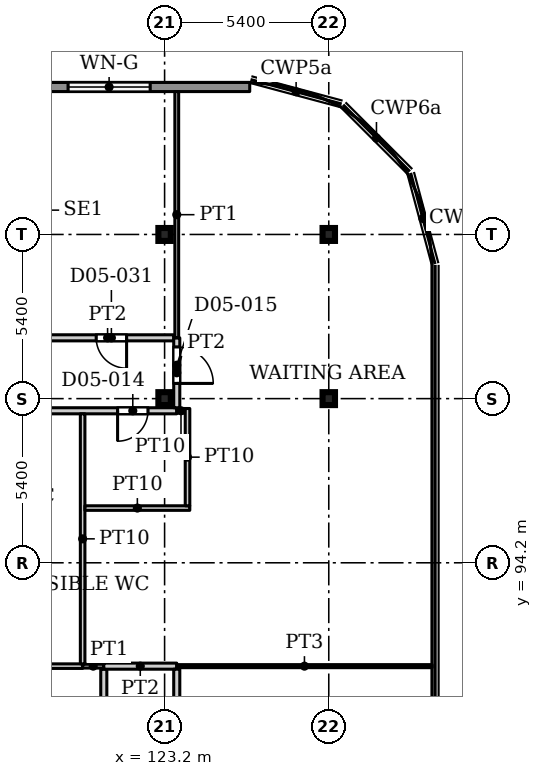
"""IFC4 building model, lengths in metres.
Left out: names, types, materials, properties, quantities, classifications, styles, units other than length and angle.
Written with IfcOpenShell. Run it as: python <this file> out.ifc"""

import sys

from ifc_helpers import new_model, si_unit, direction, frame, frame_2d, origin, origin_2d, place, context, subcontext, project, spatial, rectangle, i_section, extrude, source, transform, mapped, element, fill, save


model = new_model("IFC4")
c1 = context("Model", 3, precision=1e-05, world=origin(), true_north=direction((0.0, 1.0)))
c2 = subcontext(c1, "Body", "Model", "MODEL_VIEW")
j1 = project(units=[si_unit("LENGTHUNIT", "METRE"), si_unit("PLANEANGLEUNIT", "RADIAN")], contexts=[c1])
p1 = place(None, origin())
s1 = spatial("IfcSite", under=j1, at=p1, CompositionType="ELEMENT")
p2 = place(p1, origin())
s2 = spatial("IfcBuilding", under=s1, at=p2, CompositionType="ELEMENT")
p3 = place(p2, frame((0.0, 0.0, 26.0)))
s3 = spatial("IfcBuildingStorey", under=s2, at=p3, CompositionType="ELEMENT", Elevation=26.0)
for number, where, z_axis, x_axis in (
    (1, (123.2, 99.6, 0.0), (0.0, 0.0, 1.0), (1.0, 0.0, 0.0)),
    (2, (128.6, 99.6, 0.0), (0.0, 0.0, 1.0), (1.0, 0.0, 0.0)),
    (3, (123.2, 105.0, 0.0), (0.0, 0.0, 1.0), (1.0, 0.0, 0.0)),
    (4, (128.6, 105.0, 0.0), (0.0, 0.0, 1.0), (1.0, 0.0, 0.0)),
):
    element("IfcColumn", number, at=place(p3, frame(where, z_axis=z_axis, x_axis=x_axis)), inside=s3, PredefinedType="COLUMN", context=c2, shape_type="SweptSolid", body=[
        extrude(i_section(OverallWidth=0.409, OverallDepth=0.425, WebThickness=0.033, FlangeThickness=0.052, FilletRadius=0.013, at=origin_2d()), origin(), (0.0, 0.0, 1.0), 4.5),
    ])
p4 = place(p3, frame((78.48, 109.85, 0.0), z_axis=(0.0, 0.0, 1.0), x_axis=(1.0, 0.0, 0.0)))
e5 = element("IfcWall", 5, at=p4, inside=s3, PredefinedType="SOLIDWALL", context=c2, shape_type="SweptSolid", body=[
    extrude(rectangle(XDim=47.52, YDim=0.3, at=frame_2d((23.76, 0.0))), origin(), (0.0, 0.0, 1.0), 4.25),
])
p5 = place(p4, frame((1.045, 0.0, 2.4)))
e6 = element("IfcOpeningElement", 6, at=p5, cuts=e5, PredefinedType="OPENING", context=c2, shape_type="SweptSolid", body=[
    extrude(rectangle(XDim=2.7, YDim=1.2, at=frame_2d((1.35, 0.6))), frame((0.0, 0.16, 0.0), z_axis=(0.0, -1.0, 0.0), x_axis=(1.0, 0.0, 0.0)), (0.0, 0.0, 1.0), 0.32),
])
p6 = place(p4, frame((6.28, 0.0, 2.4)))
e7 = element("IfcOpeningElement", 7, at=p6, cuts=e5, PredefinedType="OPENING", context=c2, shape_type="SweptSolid", body=[
    extrude(rectangle(XDim=2.7, YDim=1.2, at=frame_2d((1.35, 0.6))), frame((0.0, 0.16, 0.0), z_axis=(0.0, -1.0, 0.0), x_axis=(1.0, 0.0, 0.0)), (0.0, 0.0, 1.0), 0.32),
])
p7 = place(p4, frame((15.765, 0.0, 2.4)))
e8 = element("IfcOpeningElement", 8, at=p7, cuts=e5, PredefinedType="OPENING", context=c2, shape_type="SweptSolid", body=[
    extrude(rectangle(XDim=2.7, YDim=1.2, at=frame_2d((1.35, 0.6))), frame((0.0, 0.16, 0.0), z_axis=(0.0, -1.0, 0.0), x_axis=(1.0, 0.0, 0.0)), (0.0, 0.0, 1.0), 0.32),
])
p8 = place(p4, frame((22.47, 0.0, 2.4)))
e9 = element("IfcOpeningElement", 9, at=p8, cuts=e5, PredefinedType="OPENING", context=c2, shape_type="SweptSolid", body=[
    extrude(rectangle(XDim=2.7, YDim=1.2, at=frame_2d((1.35, 0.6))), frame((0.0, 0.16, 0.0), z_axis=(0.0, -1.0, 0.0), x_axis=(1.0, 0.0, 0.0)), (0.0, 0.0, 1.0), 0.32),
])
p9 = place(p4, frame((30.99, 0.0, 2.4)))
e10 = element("IfcOpeningElement", 10, at=p9, cuts=e5, PredefinedType="OPENING", context=c2, shape_type="SweptSolid", body=[
    extrude(rectangle(XDim=2.7, YDim=1.2, at=frame_2d((1.35, 0.6))), frame((0.0, 0.16, 0.0), z_axis=(0.0, -1.0, 0.0), x_axis=(1.0, 0.0, 0.0)), (0.0, 0.0, 1.0), 0.32),
])
p10 = place(p4, frame((41.545, 0.0, 2.4)))
e11 = element("IfcOpeningElement", 11, at=p10, cuts=e5, PredefinedType="OPENING", context=c2, shape_type="SweptSolid", body=[
    extrude(rectangle(XDim=2.7, YDim=1.2, at=frame_2d((1.35, 0.6))), frame((0.0, 0.16, 0.0), z_axis=(0.0, -1.0, 0.0), x_axis=(1.0, 0.0, 0.0)), (0.0, 0.0, 1.0), 0.32),
])
p11 = place(p3, frame((56.1, 99.2, 0.0), z_axis=(0.0, 0.0, 1.0), x_axis=(1.0, 0.0, 0.0)))
e12 = element("IfcWall", 12, at=p11, inside=s3, PredefinedType="PARTITIONING", context=c2, shape_type="SweptSolid", body=[
    extrude(rectangle(XDim=67.5, YDim=0.2, at=frame_2d((33.75, 0.0))), origin(), (0.0, 0.0, 1.0), 4.2),
])
p12 = place(p11, frame((4.05, 0.0, 0.0)))
e13 = element("IfcOpeningElement", 13, at=p12, cuts=e12, PredefinedType="OPENING", context=c2, shape_type="SweptSolid", body=[
    extrude(rectangle(XDim=1.0, YDim=2.1, at=frame_2d((0.5, 1.05))), frame((0.0, 0.11, 0.0), z_axis=(0.0, -1.0, 0.0), x_axis=(1.0, 0.0, 0.0)), (0.0, 0.0, 1.0), 0.22),
])
p13 = place(p11, frame((65.554, 0.0, 0.0)))
e14 = element("IfcOpeningElement", 14, at=p13, cuts=e12, PredefinedType="OPENING", context=c2, shape_type="SweptSolid", body=[
    extrude(rectangle(XDim=1.0, YDim=2.1, at=frame_2d((0.5, 1.05))), frame((0.0, 0.11, 0.0), z_axis=(0.0, -1.0, 0.0), x_axis=(1.0, 0.0, 0.0)), (0.0, 0.0, 1.0), 0.22),
])
p14 = place(p11, frame((11.589, 0.0, 0.0)))
e15 = element("IfcOpeningElement", 15, at=p14, cuts=e12, PredefinedType="OPENING", context=c2, shape_type="SweptSolid", body=[
    extrude(rectangle(XDim=1.0, YDim=2.1, at=frame_2d((0.5, 1.05))), frame((0.0, 0.11, 0.0), z_axis=(0.0, -1.0, 0.0), x_axis=(1.0, 0.0, 0.0)), (0.0, 0.0, 1.0), 0.22),
])
p15 = place(p11, frame((20.329, 0.0, 0.0)))
e16 = element("IfcOpeningElement", 16, at=p15, cuts=e12, PredefinedType="OPENING", context=c2, shape_type="SweptSolid", body=[
    extrude(rectangle(XDim=1.0, YDim=2.1, at=frame_2d((0.5, 1.05))), frame((0.0, 0.11, 0.0), z_axis=(0.0, -1.0, 0.0), x_axis=(1.0, 0.0, 0.0)), (0.0, 0.0, 1.0), 0.22),
])
p16 = place(p11, frame((27.319, 0.0, 0.0)))
e17 = element("IfcOpeningElement", 17, at=p16, cuts=e12, PredefinedType="OPENING", context=c2, shape_type="SweptSolid", body=[
    extrude(rectangle(XDim=1.0, YDim=2.1, at=frame_2d((0.5, 1.05))), frame((0.0, 0.11, 0.0), z_axis=(0.0, -1.0, 0.0), x_axis=(1.0, 0.0, 0.0)), (0.0, 0.0, 1.0), 0.22),
])
p17 = place(p11, frame((33.262, 0.0, 0.0)))
e18 = element("IfcOpeningElement", 18, at=p17, cuts=e12, PredefinedType="OPENING", context=c2, shape_type="SweptSolid", body=[
    extrude(rectangle(XDim=1.0, YDim=2.1, at=frame_2d((0.5, 1.05))), frame((0.0, 0.11, 0.0), z_axis=(0.0, -1.0, 0.0), x_axis=(1.0, 0.0, 0.0)), (0.0, 0.0, 1.0), 0.22),
])
p18 = place(p11, frame((42.002, 0.0, 0.0)))
e19 = element("IfcOpeningElement", 19, at=p18, cuts=e12, PredefinedType="OPENING", context=c2, shape_type="SweptSolid", body=[
    extrude(rectangle(XDim=1.0, YDim=2.1, at=frame_2d((0.5, 1.05))), frame((0.0, 0.11, 0.0), z_axis=(0.0, -1.0, 0.0), x_axis=(1.0, 0.0, 0.0)), (0.0, 0.0, 1.0), 0.22),
])
p19 = place(p11, frame((49.743, 0.0, 0.0)))
e20 = element("IfcOpeningElement", 20, at=p19, cuts=e12, PredefinedType="OPENING", context=c2, shape_type="SweptSolid", body=[
    extrude(rectangle(XDim=1.0, YDim=2.1, at=frame_2d((0.5, 1.05))), frame((0.0, 0.11, 0.0), z_axis=(0.0, -1.0, 0.0), x_axis=(1.0, 0.0, 0.0)), (0.0, 0.0, 1.0), 0.22),
])
p20 = place(p11, frame((56.733, 0.0, 0.0)))
e21 = element("IfcOpeningElement", 21, at=p20, cuts=e12, PredefinedType="OPENING", context=c2, shape_type="SweptSolid", body=[
    extrude(rectangle(XDim=1.0, YDim=2.1, at=frame_2d((0.5, 1.05))), frame((0.0, 0.11, 0.0), z_axis=(0.0, -1.0, 0.0), x_axis=(1.0, 0.0, 0.0)), (0.0, 0.0, 1.0), 0.22),
])
p21 = place(p11, frame((61.394, 0.0, 0.0)))
e22 = element("IfcOpeningElement", 22, at=p21, cuts=e12, PredefinedType="OPENING", context=c2, shape_type="SweptSolid", body=[
    extrude(rectangle(XDim=1.0, YDim=2.1, at=frame_2d((0.5, 1.05))), frame((0.0, 0.11, 0.0), z_axis=(0.0, -1.0, 0.0), x_axis=(1.0, 0.0, 0.0)), (0.0, 0.0, 1.0), 0.22),
])
p22 = place(p3, frame((110.183, 90.8, 0.0), z_axis=(0.0, 0.0, 1.0), x_axis=(1.0, 0.0, 0.0)))
e23 = element("IfcWall", 23, at=p22, inside=s3, PredefinedType="PARTITIONING", context=c2, shape_type="SweptSolid", body=[
    extrude(rectangle(XDim=10.321, YDim=0.15, at=frame_2d((5.16, 0.0))), origin(), (0.0, 0.0, 1.0), 4.2),
])
p23 = place(p3, frame((119.15, 101.6, 0.0), z_axis=(0.0, 0.0, 1.0), x_axis=(1.0, 0.0, 0.0)))
e24 = element("IfcWall", 24, at=p23, inside=s3, PredefinedType="PARTITIONING", context=c2, shape_type="SweptSolid", body=[
    extrude(rectangle(XDim=4.35, YDim=0.2, at=frame_2d((2.175, 0.0))), origin(), (0.0, 0.0, 1.0), 4.2),
])
p24 = place(p23, frame((1.8, 0.0, 0.0)))
e25 = element("IfcOpeningElement", 25, at=p24, cuts=e24, PredefinedType="OPENING", context=c2, shape_type="SweptSolid", body=[
    extrude(rectangle(XDim=1.0, YDim=2.1, at=frame_2d((0.5, 1.05))), frame((0.0, 0.11, 0.0), z_axis=(0.0, -1.0, 0.0), x_axis=(1.0, 0.0, 0.0)), (0.0, 0.0, 1.0), 0.22),
])
p25 = place(p3, frame((120.504, 90.8, 0.0), z_axis=(0.0, 0.0, 1.0), x_axis=(1.0, 0.0, 0.0)))
e26 = element("IfcWall", 26, at=p25, inside=s3, PredefinedType="PARTITIONING", context=c2, shape_type="SweptSolid", body=[
    extrude(rectangle(XDim=0.696, YDim=0.125, at=frame_2d((0.348, 0.0))), origin(), (0.0, 0.0, 1.0), 4.2),
])
p26 = place(p3, frame((120.504, 90.875, 0.0), z_axis=(0.0, 0.0, 1.0), x_axis=(0.0, 1.0, 0.0)))
e27 = element("IfcWall", 27, at=p26, inside=s3, PredefinedType="PARTITIONING", context=c2, shape_type="SweptSolid", body=[
    extrude(rectangle(XDim=8.225, YDim=0.15, at=frame_2d((4.113, 0.0))), origin(), (0.0, 0.0, 1.0), 4.2),
])
p27 = place(p3, frame((120.579, 96.0, 0.0), z_axis=(0.0, 0.0, 1.0), x_axis=(1.0, 0.0, 0.0)))
e28 = element("IfcWall", 28, at=p27, inside=s3, PredefinedType="PARTITIONING", context=c2, shape_type="SweptSolid", body=[
    extrude(rectangle(XDim=3.45, YDim=0.15, at=frame_2d((1.725, 0.0))), origin(), (0.0, 0.0, 1.0), 4.2),
])
p28 = place(p3, frame((121.2, 74.6, 0.0), z_axis=(0.0, 0.0, 1.0), x_axis=(0.0, 1.0, 0.0)))
e29 = element("IfcWall", 29, at=p28, inside=s3, PredefinedType="PARTITIONING", context=c2, shape_type="SweptSolid", body=[
    extrude(rectangle(XDim=16.1, YDim=0.2, at=frame_2d((8.05, 0.0))), origin(), (0.0, 0.0, 1.0), 4.2),
])
p29 = place(p28, frame((3.987, 0.0, 0.0)))
e30 = element("IfcOpeningElement", 30, at=p29, cuts=e29, PredefinedType="OPENING", context=c2, shape_type="SweptSolid", body=[
    extrude(rectangle(XDim=1.0, YDim=2.1, at=frame_2d((0.5, 1.05))), frame((0.0, 0.11, 0.0), z_axis=(0.0, -1.0, 0.0), x_axis=(1.0, 0.0, 0.0)), (0.0, 0.0, 1.0), 0.22),
])
p30 = place(p28, frame((12.05, 0.0, 0.0)))
e31 = element("IfcOpeningElement", 31, at=p30, cuts=e29, PredefinedType="OPENING", context=c2, shape_type="SweptSolid", body=[
    extrude(rectangle(XDim=1.0, YDim=2.1, at=frame_2d((0.5, 1.05))), frame((0.0, 0.11, 0.0), z_axis=(0.0, -1.0, 0.0), x_axis=(1.0, 0.0, 0.0)), (0.0, 0.0, 1.0), 0.22),
])
p31 = place(p3, frame((121.2, 90.8, 0.0), z_axis=(0.0, 0.0, 1.0), x_axis=(1.0, 0.0, 0.0)))
e32 = element("IfcWall", 32, at=p31, inside=s3, PredefinedType="PARTITIONING", context=c2, shape_type="SweptSolid", body=[
    extrude(rectangle(XDim=2.4, YDim=0.2, at=frame_2d((1.2, 0.0))), origin(), (0.0, 0.0, 1.0), 4.2),
])
p32 = place(p3, frame((123.6, 69.15, 0.0), z_axis=(0.0, 0.0, 1.0), x_axis=(0.0, 1.0, 0.0)))
e33 = element("IfcWall", 33, at=p32, inside=s3, PredefinedType="PARTITIONING", context=c2, shape_type="SweptSolid", body=[
    extrude(rectangle(XDim=21.55, YDim=0.2, at=frame_2d((10.775, 0.0))), origin(), (0.0, 0.0, 1.0), 4.2),
])
p33 = place(p32, frame((4.4, 0.0, 0.0)))
e34 = element("IfcOpeningElement", 34, at=p33, cuts=e33, PredefinedType="OPENING", context=c2, shape_type="SweptSolid", body=[
    extrude(rectangle(XDim=1.0, YDim=2.1, at=frame_2d((0.5, 1.05))), frame((0.0, 0.11, 0.0), z_axis=(0.0, -1.0, 0.0), x_axis=(1.0, 0.0, 0.0)), (0.0, 0.0, 1.0), 0.22),
])
p34 = place(p32, frame((15.238, 0.0, 0.0)))
e35 = element("IfcOpeningElement", 35, at=p34, cuts=e33, PredefinedType="OPENING", context=c2, shape_type="SweptSolid", body=[
    extrude(rectangle(XDim=1.0, YDim=2.1, at=frame_2d((0.5, 1.05))), frame((0.0, 0.11, 0.0), z_axis=(0.0, -1.0, 0.0), x_axis=(1.0, 0.0, 0.0)), (0.0, 0.0, 1.0), 0.22),
])
p35 = place(p32, frame((11.238, 0.0, 0.0)))
e36 = element("IfcOpeningElement", 36, at=p35, cuts=e33, PredefinedType="OPENING", context=c2, shape_type="SweptSolid", body=[
    extrude(rectangle(XDim=1.2, YDim=2.1, at=frame_2d((0.6, 1.05))), frame((0.0, 0.11, 0.0), z_axis=(0.0, -1.0, 0.0), x_axis=(1.0, 0.0, 0.0)), (0.0, 0.0, 1.0), 0.22),
])
p36 = place(p3, frame((123.6, 90.8, 0.0), z_axis=(0.0, 0.0, 1.0), x_axis=(1.0, 0.0, 0.0)))
e37 = element("IfcWall", 37, at=p36, inside=s3, PredefinedType="PARTITIONING", context=c2, shape_type="SweptSolid", body=[
    extrude(rectangle(XDim=8.4, YDim=0.1, at=frame_2d((4.2, 0.0))), origin(), (0.0, 0.0, 1.0), 4.2),
])
p37 = place(p3, frame((123.6, 99.2, 0.0), z_axis=(0.0, 0.0, 1.0), x_axis=(1.0, 0.0, 0.0)))
e38 = element("IfcWall", 38, at=p37, inside=s3, PredefinedType="PARTITIONING", context=c2, shape_type="SweptSolid", body=[
    extrude(rectangle(XDim=0.279, YDim=0.15, at=frame_2d((0.139, 0.0))), origin(), (0.0, 0.0, 1.0), 4.2),
])
p38 = place(p3, frame((123.6, 99.3, 0.0), z_axis=(0.0, 0.0, 1.0), x_axis=(0.0, 1.0, 0.0)))
e39 = element("IfcWall", 39, at=p38, inside=s3, PredefinedType="PARTITIONING", context=c2, shape_type="SweptSolid", body=[
    extrude(rectangle(XDim=2.3, YDim=0.2, at=frame_2d((1.15, 0.0))), origin(), (0.0, 0.0, 1.0), 4.2),
])
p39 = place(p38, frame((0.8, 0.0, 0.0)))
e40 = element("IfcOpeningElement", 40, at=p39, cuts=e39, PredefinedType="OPENING", context=c2, shape_type="SweptSolid", body=[
    extrude(rectangle(XDim=1.2, YDim=2.1, at=frame_2d((0.6, 1.05))), frame((0.0, 0.11, 0.0), z_axis=(0.0, -1.0, 0.0), x_axis=(1.0, 0.0, 0.0)), (0.0, 0.0, 1.0), 0.22),
])
p40 = place(p3, frame((123.6, 101.6, 0.0), z_axis=(0.0, 0.0, 1.0), x_axis=(0.0, 1.0, 0.0)))
e41 = element("IfcWall", 41, at=p40, inside=s3, PredefinedType="PARTITIONING", context=c2, shape_type="SweptSolid", body=[
    extrude(rectangle(XDim=8.101, YDim=0.125, at=frame_2d((4.05, 0.0))), origin(), (0.0, 0.0, 1.0), 4.2),
])
p41 = place(p3, frame((123.954, 96.075, 0.0), z_axis=(0.0, 0.0, 1.0), x_axis=(0.0, 1.0, 0.0)))
e42 = element("IfcWall", 42, at=p41, inside=s3, PredefinedType="PARTITIONING", context=c2, shape_type="SweptSolid", body=[
    extrude(rectangle(XDim=3.2, YDim=0.15, at=frame_2d((1.6, 0.0))), origin(), (0.0, 0.0, 1.0), 4.2),
])
m1 = source(origin(), c2, "Body", "SweptSolid", [
    extrude(rectangle(XDim=2.7, YDim=1.2, at=frame_2d((1.35, 0.6))), frame((0.0, 0.03, 0.0), z_axis=(0.0, -1.0, 0.0), x_axis=(1.0, 0.0, 0.0)), (0.0, 0.0, 1.0), 0.06),
])
p42 = place(p10, origin())
e43 = element("IfcWindow", 43, at=p42, inside=s3, PartitioningType="SINGLE_PANEL", PredefinedType="WINDOW", context=c2, shape_type="MappedRepresentation", body=[
    mapped(m1, transform((0.0, 0.0, 0.0), x_axis=(1.0, 0.0, 0.0), y_axis=(0.0, 1.0, 0.0), z_axis=(0.0, 0.0, 1.0), scale=1.0)),
])
fill(e11, e43)
m2 = source(origin(), c2, "Body", "SweptSolid", [
    extrude(rectangle(XDim=1.0, YDim=2.1, at=frame_2d((0.5, 1.05))), frame((0.0, 0.025, 0.0), z_axis=(0.0, -1.0, 0.0), x_axis=(1.0, 0.0, 0.0)), (0.0, 0.0, 1.0), 0.05),
])
p43 = place(p13, origin())
e44 = element("IfcDoor", 44, at=p43, inside=s3, OperationType="SINGLE_SWING_RIGHT", PredefinedType="DOOR", context=c2, shape_type="MappedRepresentation", body=[
    mapped(m2, transform((0.0, 0.0, 0.0), x_axis=(1.0, 0.0, 0.0), y_axis=(0.0, 1.0, 0.0), z_axis=(0.0, 0.0, 1.0), scale=1.0)),
])
fill(e14, e44)
m3 = source(origin(), c2, "Body", "SweptSolid", [
    extrude(rectangle(XDim=1.2, YDim=2.1, at=frame_2d((0.6, 1.05))), frame((0.0, 0.025, 0.0), z_axis=(0.0, -1.0, 0.0), x_axis=(1.0, 0.0, 0.0)), (0.0, 0.0, 1.0), 0.05),
])
p44 = place(p39, origin())
e45 = element("IfcDoor", 45, at=p44, inside=s3, OperationType="SINGLE_SWING_RIGHT", PredefinedType="DOOR", context=c2, shape_type="MappedRepresentation", body=[
    mapped(m3, transform((0.0, 0.0, 0.0), x_axis=(1.0, 0.0, 0.0), y_axis=(0.0, 1.0, 0.0), z_axis=(0.0, 0.0, 1.0), scale=1.0)),
])
fill(e40, e45)
p45 = place(p24, origin())
e46 = element("IfcDoor", 46, at=p45, inside=s3, OperationType="SINGLE_SWING_RIGHT", PredefinedType="DOOR", context=c2, shape_type="MappedRepresentation", body=[
    mapped(m2, transform((0.0, 0.0, 0.0), x_axis=(1.0, 0.0, 0.0), y_axis=(0.0, 1.0, 0.0), z_axis=(0.0, 0.0, 1.0), scale=1.0)),
])
fill(e25, e46)
save(model, sys.argv[1])
